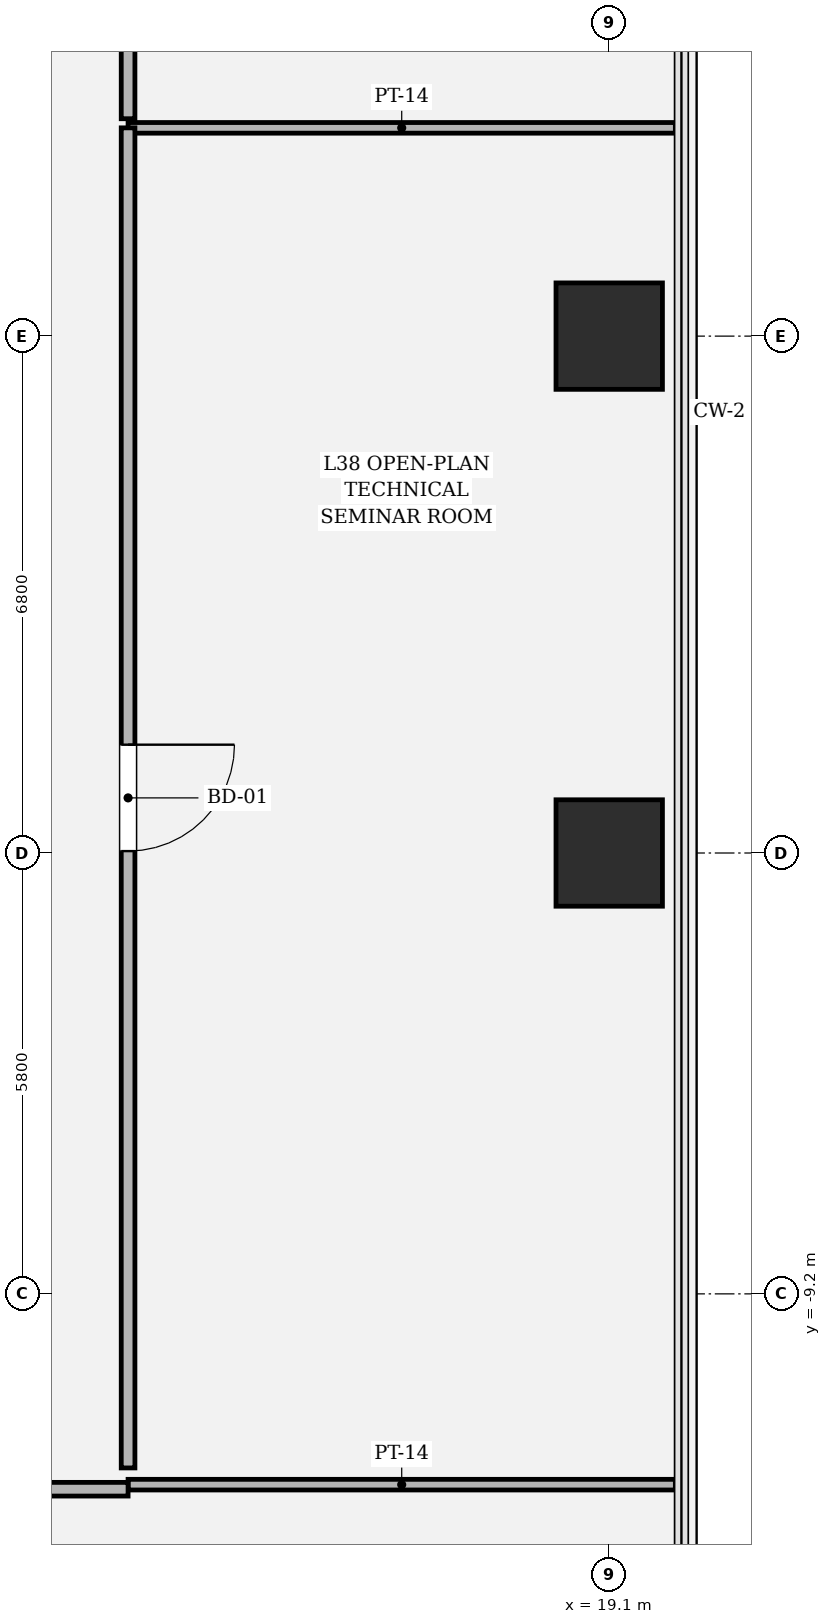
"""IFC4 building model, lengths in metres.
Left out: names, types, materials, properties, quantities, classifications, styles, units other than length and angle.
Written with IfcOpenShell. Run it as: python <this file> out.ifc"""

import sys

from ifc_helpers import new_model, si_unit, direction, frame, frame_2d, origin, origin_2d, place, context, subcontext, project, spatial, rectangle, hollow_rectangle, extrude, element, fill, save


model = new_model("IFC4")
c1 = context("Model", 3, precision=1e-05, world=origin(), true_north=direction((0.0, 1.0)))
c2 = subcontext(c1, "Body", "Model", "MODEL_VIEW")
j1 = project(units=[si_unit("LENGTHUNIT", "METRE"), si_unit("PLANEANGLEUNIT", "RADIAN")], contexts=[c1])
p1 = place(None, origin())
s1 = spatial("IfcSite", under=j1, at=p1, CompositionType="ELEMENT")
p2 = place(p1, origin())
s2 = spatial("IfcBuilding", under=s1, at=p2, CompositionType="ELEMENT")
p3 = place(p2, frame((0.0, 0.0, 164.1)))
s3 = spatial("IfcBuildingStorey", under=s2, at=p3, CompositionType="ELEMENT", Elevation=164.1)
for number, where, z_axis, x_axis in (
    (1, (19.1, -3.4, 0.0), (0.0, 0.0, 1.0), (1.0, 0.0, 0.0)),
    (2, (19.1, 3.4, 0.0), (0.0, 0.0, 1.0), (1.0, 0.0, 0.0)),
):
    element("IfcColumn", number, at=place(p3, frame(where, z_axis=z_axis, x_axis=x_axis)), inside=s3, PredefinedType="COLUMN", context=c2, shape_type="SweptSolid", body=[
        extrude(hollow_rectangle(XDim=1.4, YDim=1.4, WallThickness=0.042, at=origin_2d()), origin(), (0.0, 0.0, 1.0), 4.05),
    ])
p4 = place(p3, frame((12.77, -11.71, 0.0), z_axis=(0.0, 0.0, 1.0), x_axis=(1.0, 0.0, 0.0)))
e3 = element("IfcWall", 3, at=p4, inside=s3, PredefinedType="PARTITIONING", context=c2, shape_type="SweptSolid", body=[
    extrude(rectangle(XDim=7.2, YDim=0.14, at=frame_2d((3.6, 0.0))), origin(), (0.0, 0.0, 1.0), 3.174),
])
p5 = place(p3, frame((3.679, -11.77, 0.0), z_axis=(0.0, 0.0, 1.0), x_axis=(1.0, 0.0, 0.0)))
e4 = element("IfcWall", 4, at=p5, inside=s3, PredefinedType="PARTITIONING", context=c2, shape_type="SweptSolid", body=[
    extrude(rectangle(XDim=9.091, YDim=0.18, at=frame_2d((4.545, 0.0))), origin(), (0.0, 0.0, 1.0), 3.174),
])
p6 = place(p5, frame((4.021, 0.0, 0.0)))
e5 = element("IfcOpeningElement", 5, at=p6, cuts=e4, PredefinedType="OPENING", context=c2, shape_type="SweptSolid", body=[
    extrude(rectangle(XDim=1.05, YDim=2.2, at=frame_2d((0.525, 1.1))), frame((0.0, 0.1, 0.0), z_axis=(0.0, -1.0, 0.0), x_axis=(1.0, 0.0, 0.0)), (0.0, 0.0, 1.0), 0.2),
])
p7 = place(p3, frame((12.77, 6.14, 0.0), z_axis=(0.0, 0.0, 1.0), x_axis=(1.0, 0.0, 0.0)))
e6 = element("IfcWall", 6, at=p7, inside=s3, PredefinedType="PARTITIONING", context=c2, shape_type="SweptSolid", body=[
    extrude(rectangle(XDim=7.2, YDim=0.14, at=frame_2d((3.6, 0.0))), origin(), (0.0, 0.0, 1.0), 3.174),
])
p8 = place(p3, frame((12.77, -11.49, 0.0), z_axis=(0.0, 0.0, 1.0), x_axis=(0.0, 1.0, 0.0)))
e7 = element("IfcWall", 7, at=p8, inside=s3, PredefinedType="PARTITIONING", context=c2, shape_type="SweptSolid", body=[
    extrude(rectangle(XDim=17.63, YDim=0.18, at=frame_2d((8.815, 0.0))), origin(), (0.0, 0.0, 1.0), 3.174),
])
p9 = place(p8, frame((8.115, 0.0, 0.0)))
e8 = element("IfcOpeningElement", 8, at=p9, cuts=e7, PredefinedType="OPENING", context=c2, shape_type="SweptSolid", body=[
    extrude(rectangle(XDim=1.4, YDim=2.25, at=frame_2d((0.7, 1.125))), frame((0.0, 0.1, 0.0), z_axis=(0.0, -1.0, 0.0), x_axis=(1.0, 0.0, 0.0)), (0.0, 0.0, 1.0), 0.2),
])
p10 = place(p3, frame((12.77, 6.26, 0.0), z_axis=(0.0, 0.0, 1.0), x_axis=(0.0, 1.0, 0.0)))
e9 = element("IfcWall", 9, at=p10, inside=s3, PredefinedType="PARTITIONING", context=c2, shape_type="SweptSolid", body=[
    extrude(rectangle(XDim=16.91, YDim=0.18, at=frame_2d((8.455, 0.0))), origin(), (0.0, 0.0, 1.0), 2.544),
])
p11 = place(p10, frame((7.93, 0.0, 0.0)))
e10 = element("IfcOpeningElement", 10, at=p11, cuts=e9, PredefinedType="OPENING", context=c2, shape_type="SweptSolid", body=[
    extrude(rectangle(XDim=1.05, YDim=2.2, at=frame_2d((0.525, 1.1))), frame((0.0, 0.1, 0.0), z_axis=(0.0, -1.0, 0.0), x_axis=(1.0, 0.0, 0.0)), (0.0, 0.0, 1.0), 0.2),
])
p12 = place(p9, origin())
e11 = element("IfcDoor", 11, at=p12, inside=s3, OperationType="SINGLE_SWING_RIGHT", PredefinedType="DOOR", context=c2, shape_type="SweptSolid", body=[
    extrude(rectangle(XDim=1.4, YDim=2.25, at=frame_2d((0.7, 1.125))), frame((0.0, 0.025, 0.0), z_axis=(0.0, -1.0, 0.0), x_axis=(1.0, 0.0, 0.0)), (0.0, 0.0, 1.0), 0.05),
])
fill(e8, e11)
save(model, sys.argv[1])
